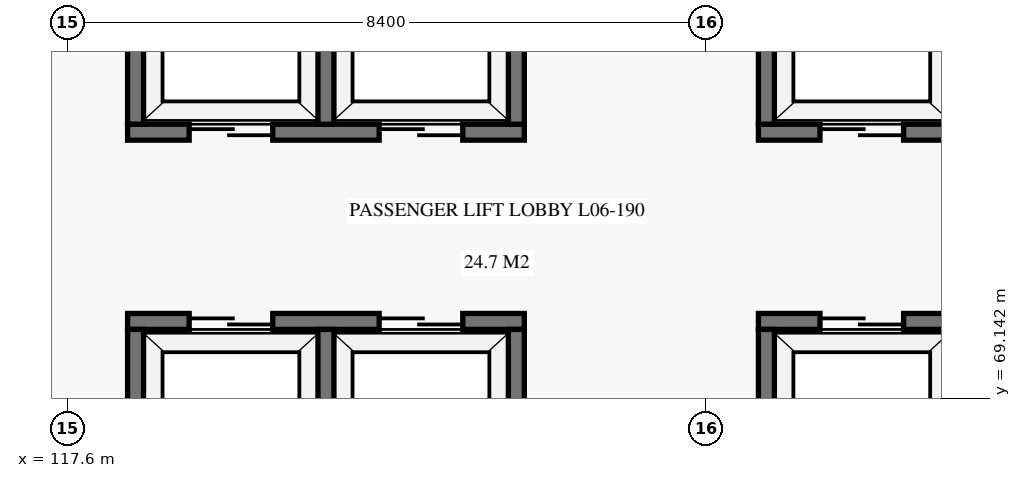
"""IFC4 building model, lengths in metres.
Left out: names, types, materials, properties, quantities, classifications, styles, units other than length and angle.
Written with IfcOpenShell. Run it as: python <this file> out.ifc"""

import sys

from ifc_helpers import new_model, si_unit, direction, frame, frame_2d, origin, place, context, subcontext, project, spatial, rectangle, extrude, element, fill, save


model = new_model("IFC4")
c1 = context("Model", 3, precision=1e-05, world=origin(), true_north=direction((0.0, 1.0)))
c2 = subcontext(c1, "Body", "Model", "MODEL_VIEW")
j1 = project(units=[si_unit("LENGTHUNIT", "METRE"), si_unit("PLANEANGLEUNIT", "RADIAN")], contexts=[c1])
p1 = place(None, origin())
s1 = spatial("IfcSite", under=j1, at=p1, CompositionType="ELEMENT")
p2 = place(p1, origin())
s2 = spatial("IfcBuilding", under=s1, at=p2, CompositionType="ELEMENT")
p3 = place(p2, frame((0.0, 0.0, 26.7)))
s3 = spatial("IfcBuildingStorey", under=s2, at=p3, CompositionType="ELEMENT", Elevation=26.7)
p4 = place(p3, frame((126.69, 70.155, 0.0), z_axis=(0.0, 0.0, 1.0), x_axis=(1.0, 0.0, 0.0)))
e1 = element("IfcWall", 1, at=p4, inside=s3, PredefinedType="SHEAR", context=c2, shape_type="SweptSolid", body=[
    extrude(rectangle(XDim=5.22, YDim=0.21, at=frame_2d((2.61, 0.0))), origin(), (0.0, 0.0, 1.0), 3.72),
])
p5 = place(p4, frame((0.81, 0.0, 0.0)))
e2 = element("IfcOpeningElement", 2, at=p5, cuts=e1, PredefinedType="OPENING", context=c2, shape_type="SweptSolid", body=[
    extrude(rectangle(XDim=1.1, YDim=2.15, at=frame_2d((0.55, 1.075))), frame((0.0, 0.115, 0.0), z_axis=(0.0, -1.0, 0.0), x_axis=(1.0, 0.0, 0.0)), (0.0, 0.0, 1.0), 0.23),
])
p6 = place(p4, frame((3.31, 0.0, 0.0)))
e3 = element("IfcOpeningElement", 3, at=p6, cuts=e1, PredefinedType="OPENING", context=c2, shape_type="SweptSolid", body=[
    extrude(rectangle(XDim=1.1, YDim=2.15, at=frame_2d((0.55, 1.075))), frame((0.0, 0.115, 0.0), z_axis=(0.0, -1.0, 0.0), x_axis=(1.0, 0.0, 0.0)), (0.0, 0.0, 1.0), 0.23),
])
p7 = place(p3, frame((126.795, 67.85, 0.0), z_axis=(0.0, 0.0, 1.0), x_axis=(0.0, 1.0, 0.0)))
e4 = element("IfcWall", 4, at=p7, inside=s3, PredefinedType="SHEAR", context=c2, shape_type="SweptSolid", body=[
    extrude(rectangle(XDim=2.2, YDim=0.21, at=frame_2d((1.1, 0.0))), origin(), (0.0, 0.0, 1.0), 3.72),
])
p8 = place(p3, frame((126.69, 72.645, 0.0), z_axis=(0.0, 0.0, 1.0), x_axis=(1.0, 0.0, 0.0)))
e5 = element("IfcWall", 5, at=p8, inside=s3, PredefinedType="SHEAR", context=c2, shape_type="SweptSolid", body=[
    extrude(rectangle(XDim=5.22, YDim=0.21, at=frame_2d((2.61, 0.0))), origin(), (0.0, 0.0, 1.0), 3.72),
])
p9 = place(p8, frame((0.81, 0.0, 0.0)))
e6 = element("IfcOpeningElement", 6, at=p9, cuts=e5, PredefinedType="OPENING", context=c2, shape_type="SweptSolid", body=[
    extrude(rectangle(XDim=1.1, YDim=2.15, at=frame_2d((0.55, 1.075))), frame((0.0, 0.115, 0.0), z_axis=(0.0, -1.0, 0.0), x_axis=(1.0, 0.0, 0.0)), (0.0, 0.0, 1.0), 0.23),
])
p10 = place(p8, frame((3.31, 0.0, 0.0)))
e7 = element("IfcOpeningElement", 7, at=p10, cuts=e5, PredefinedType="OPENING", context=c2, shape_type="SweptSolid", body=[
    extrude(rectangle(XDim=1.1, YDim=2.15, at=frame_2d((0.55, 1.075))), frame((0.0, 0.115, 0.0), z_axis=(0.0, -1.0, 0.0), x_axis=(1.0, 0.0, 0.0)), (0.0, 0.0, 1.0), 0.23),
])
p11 = place(p3, frame((126.795, 72.75, 0.0), z_axis=(0.0, 0.0, 1.0), x_axis=(0.0, 1.0, 0.0)))
e8 = element("IfcWall", 8, at=p11, inside=s3, PredefinedType="SHEAR", context=c2, shape_type="SweptSolid", body=[
    extrude(rectangle(XDim=2.2, YDim=0.21, at=frame_2d((1.1, 0.0))), origin(), (0.0, 0.0, 1.0), 3.72),
])
p12 = place(p3, frame((118.39, 70.155, 0.0), z_axis=(0.0, 0.0, 1.0), x_axis=(1.0, 0.0, 0.0)))
e9 = element("IfcWall", 9, at=p12, inside=s3, PredefinedType="SHEAR", context=c2, shape_type="SweptSolid", body=[
    extrude(rectangle(XDim=5.22, YDim=0.21, at=frame_2d((2.61, 0.0))), origin(), (0.0, 0.0, 1.0), 3.72),
])
p13 = place(p12, frame((0.81, 0.0, 0.0)))
e10 = element("IfcOpeningElement", 10, at=p13, cuts=e9, PredefinedType="OPENING", context=c2, shape_type="SweptSolid", body=[
    extrude(rectangle(XDim=1.1, YDim=2.15, at=frame_2d((0.55, 1.075))), frame((0.0, 0.115, 0.0), z_axis=(0.0, -1.0, 0.0), x_axis=(1.0, 0.0, 0.0)), (0.0, 0.0, 1.0), 0.23),
])
p14 = place(p12, frame((3.31, 0.0, 0.0)))
e11 = element("IfcOpeningElement", 11, at=p14, cuts=e9, PredefinedType="OPENING", context=c2, shape_type="SweptSolid", body=[
    extrude(rectangle(XDim=1.1, YDim=2.15, at=frame_2d((0.55, 1.075))), frame((0.0, 0.115, 0.0), z_axis=(0.0, -1.0, 0.0), x_axis=(1.0, 0.0, 0.0)), (0.0, 0.0, 1.0), 0.23),
])
for number, where, z_axis, x_axis in (
    (12, (118.495, 67.85, 0.0), (0.0, 0.0, 1.0), (0.0, 1.0, 0.0)),
    (13, (123.505, 67.85, 0.0), (0.0, 0.0, 1.0), (0.0, 1.0, 0.0)),
    (14, (121.0, 67.85, 0.0), (0.0, 0.0, 1.0), (0.0, 1.0, 0.0)),
):
    element("IfcWall", number, at=place(p3, frame(where, z_axis=z_axis, x_axis=x_axis)), inside=s3, PredefinedType="SHEAR", context=c2, shape_type="SweptSolid", body=[
        extrude(rectangle(XDim=2.2, YDim=0.21, at=frame_2d((1.1, 0.0))), origin(), (0.0, 0.0, 1.0), 3.72),
    ])
p15 = place(p3, frame((118.39, 72.645, 0.0), z_axis=(0.0, 0.0, 1.0), x_axis=(1.0, 0.0, 0.0)))
e15 = element("IfcWall", 15, at=p15, inside=s3, PredefinedType="SHEAR", context=c2, shape_type="SweptSolid", body=[
    extrude(rectangle(XDim=5.22, YDim=0.21, at=frame_2d((2.61, 0.0))), origin(), (0.0, 0.0, 1.0), 3.72),
])
p16 = place(p15, frame((0.81, 0.0, 0.0)))
e16 = element("IfcOpeningElement", 16, at=p16, cuts=e15, PredefinedType="OPENING", context=c2, shape_type="SweptSolid", body=[
    extrude(rectangle(XDim=1.1, YDim=2.15, at=frame_2d((0.55, 1.075))), frame((0.0, 0.115, 0.0), z_axis=(0.0, -1.0, 0.0), x_axis=(1.0, 0.0, 0.0)), (0.0, 0.0, 1.0), 0.23),
])
p17 = place(p15, frame((3.31, 0.0, 0.0)))
e17 = element("IfcOpeningElement", 17, at=p17, cuts=e15, PredefinedType="OPENING", context=c2, shape_type="SweptSolid", body=[
    extrude(rectangle(XDim=1.1, YDim=2.15, at=frame_2d((0.55, 1.075))), frame((0.0, 0.115, 0.0), z_axis=(0.0, -1.0, 0.0), x_axis=(1.0, 0.0, 0.0)), (0.0, 0.0, 1.0), 0.23),
])
for number, where, z_axis, x_axis in (
    (18, (118.495, 72.75, 0.0), (0.0, 0.0, 1.0), (0.0, 1.0, 0.0)),
    (19, (123.505, 72.75, 0.0), (0.0, 0.0, 1.0), (0.0, 1.0, 0.0)),
    (20, (121.0, 72.75, 0.0), (0.0, 0.0, 1.0), (0.0, 1.0, 0.0)),
):
    element("IfcWall", number, at=place(p3, frame(where, z_axis=z_axis, x_axis=x_axis)), inside=s3, PredefinedType="SHEAR", context=c2, shape_type="SweptSolid", body=[
        extrude(rectangle(XDim=2.2, YDim=0.21, at=frame_2d((1.1, 0.0))), origin(), (0.0, 0.0, 1.0), 3.72),
    ])
p18 = place(p5, origin())
e21 = element("IfcDoor", 21, at=p18, inside=s3, OperationType="DOUBLE_DOOR_SLIDING", PredefinedType="DOOR", context=c2, shape_type="SweptSolid", body=[
    extrude(rectangle(XDim=1.1, YDim=2.15, at=frame_2d((0.55, 1.075))), frame((0.0, 0.025, 0.0), z_axis=(0.0, -1.0, 0.0), x_axis=(1.0, 0.0, 0.0)), (0.0, 0.0, 1.0), 0.05),
])
fill(e2, e21)
p19 = place(p9, origin())
e22 = element("IfcDoor", 22, at=p19, inside=s3, OperationType="DOUBLE_DOOR_SLIDING", PredefinedType="DOOR", context=c2, shape_type="SweptSolid", body=[
    extrude(rectangle(XDim=1.1, YDim=2.15, at=frame_2d((0.55, 1.075))), frame((0.0, 0.025, 0.0), z_axis=(0.0, -1.0, 0.0), x_axis=(1.0, 0.0, 0.0)), (0.0, 0.0, 1.0), 0.05),
])
fill(e6, e22)
p20 = place(p13, origin())
e23 = element("IfcDoor", 23, at=p20, inside=s3, OperationType="DOUBLE_DOOR_SLIDING", PredefinedType="DOOR", context=c2, shape_type="SweptSolid", body=[
    extrude(rectangle(XDim=1.1, YDim=2.15, at=frame_2d((0.55, 1.075))), frame((0.0, 0.025, 0.0), z_axis=(0.0, -1.0, 0.0), x_axis=(1.0, 0.0, 0.0)), (0.0, 0.0, 1.0), 0.05),
])
fill(e10, e23)
p21 = place(p14, origin())
e24 = element("IfcDoor", 24, at=p21, inside=s3, OperationType="DOUBLE_DOOR_SLIDING", PredefinedType="DOOR", context=c2, shape_type="SweptSolid", body=[
    extrude(rectangle(XDim=1.1, YDim=2.15, at=frame_2d((0.55, 1.075))), frame((0.0, 0.025, 0.0), z_axis=(0.0, -1.0, 0.0), x_axis=(1.0, 0.0, 0.0)), (0.0, 0.0, 1.0), 0.05),
])
fill(e11, e24)
p22 = place(p16, origin())
e25 = element("IfcDoor", 25, at=p22, inside=s3, OperationType="DOUBLE_DOOR_SLIDING", PredefinedType="DOOR", context=c2, shape_type="SweptSolid", body=[
    extrude(rectangle(XDim=1.1, YDim=2.15, at=frame_2d((0.55, 1.075))), frame((0.0, 0.025, 0.0), z_axis=(0.0, -1.0, 0.0), x_axis=(1.0, 0.0, 0.0)), (0.0, 0.0, 1.0), 0.05),
])
fill(e16, e25)
p23 = place(p17, origin())
e26 = element("IfcDoor", 26, at=p23, inside=s3, OperationType="DOUBLE_DOOR_SLIDING", PredefinedType="DOOR", context=c2, shape_type="SweptSolid", body=[
    extrude(rectangle(XDim=1.1, YDim=2.15, at=frame_2d((0.55, 1.075))), frame((0.0, 0.025, 0.0), z_axis=(0.0, -1.0, 0.0), x_axis=(1.0, 0.0, 0.0)), (0.0, 0.0, 1.0), 0.05),
])
fill(e17, e26)
save(model, sys.argv[1])
